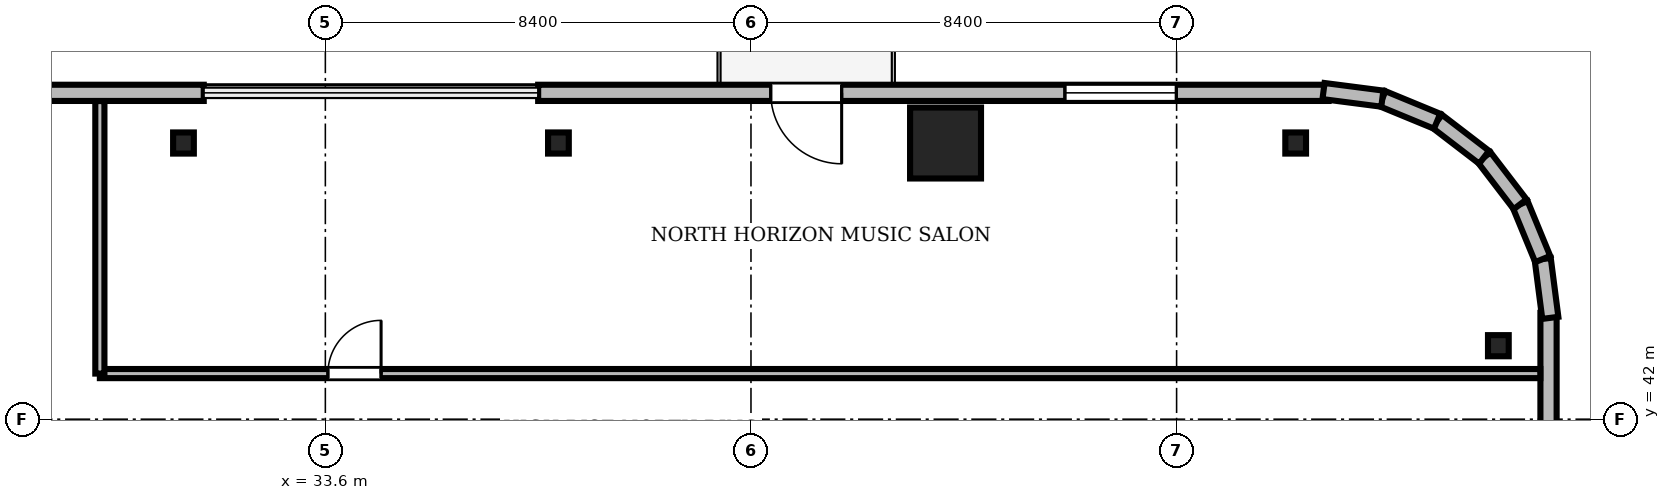
"""IFC4 building model, lengths in metres.
Left out: names, types, materials, properties, quantities, classifications, styles, units other than length and angle.
Written with IfcOpenShell. Run it as: python <this file> out.ifc"""

import sys

from ifc_helpers import new_model, si_unit, direction, frame, frame_2d, origin, origin_2d, place, context, subcontext, project, spatial, rectangle, i_section, extrude, source, transform, mapped, element, fill, save


model = new_model("IFC4")
c1 = context("Model", 3, precision=1e-05, world=origin(), true_north=direction((0.0, 1.0)))
c2 = subcontext(c1, "Body", "Model", "MODEL_VIEW")
j1 = project(units=[si_unit("LENGTHUNIT", "METRE"), si_unit("PLANEANGLEUNIT", "RADIAN")], contexts=[c1])
p1 = place(None, origin())
s1 = spatial("IfcSite", under=j1, at=p1, CompositionType="ELEMENT")
p2 = place(p1, origin())
s2 = spatial("IfcBuilding", under=s1, at=p2, CompositionType="ELEMENT")
p3 = place(p2, frame((0.0, 0.0, 184.8)))
s3 = spatial("IfcBuildingStorey", under=s2, at=p3, CompositionType="ELEMENT", Elevation=184.8)
m1 = source(origin(), c2, "Body", "SweptSolid", [
    extrude(rectangle(XDim=1.4, YDim=1.4, at=origin_2d()), origin(), (0.0, 0.0, 1.0), 3.53),
])
p4 = place(p3, frame((45.84, 47.45, 0.0), z_axis=(0.0, 0.0, 1.0), x_axis=(1.0, 0.0, 0.0)))
e1 = element("IfcColumn", 1, at=p4, inside=s3, PredefinedType="COLUMN", context=c2, shape_type="MappedRepresentation", body=[
    mapped(m1, transform((0.0, 0.0, 0.0), scale=1.0)),
])
m2 = source(origin(), c2, "Body", "SweptSolid", [
    extrude(i_section(OverallWidth=0.409, OverallDepth=0.417, WebThickness=0.021, FlangeThickness=0.033, FilletRadius=0.015, at=origin_2d()), origin(), (0.0, 0.0, 1.0), 3.53),
])
for number, where, z_axis, x_axis in (
    (2, (56.75, 43.45, 0.0), (0.0, 0.0, 1.0), (1.0, 0.0, 0.0)),
    (3, (52.75, 47.45, 0.0), (0.0, 0.0, 1.0), (1.0, 0.0, 0.0)),
    (4, (38.2, 47.45, 0.0), (0.0, 0.0, 1.0), (1.0, 0.0, 0.0)),
    (5, (30.8, 47.45, 0.0), (0.0, 0.0, 1.0), (1.0, 0.0, 0.0)),
):
    element("IfcColumn", number, at=place(p3, frame(where, z_axis=z_axis, x_axis=x_axis)), inside=s3, PredefinedType="COLUMN", context=c2, shape_type="MappedRepresentation", body=[
        mapped(m2, transform((0.0, 0.0, 0.0), scale=1.0)),
    ])
m3 = source(origin(), c2, "Body", "SweptSolid", [
    extrude(rectangle(XDim=15.6, YDim=0.32, at=frame_2d((7.8, 0.0))), origin(), (0.0, 0.0, 1.0), 3.53),
])
p5 = place(p3, frame((53.4, 48.44, 0.0), z_axis=(0.0, 0.0, 1.0), x_axis=(-1.0, 0.0, 0.0)))
e6 = element("IfcWall", 6, at=p5, inside=s3, PredefinedType="SOLIDWALL", context=c2, shape_type="MappedRepresentation", body=[
    mapped(m3, transform((0.0, 0.0, 0.0), scale=1.0)),
])
m4 = source(origin(), c2, "Body", "SweptSolid", [
    extrude(rectangle(XDim=1.4, YDim=2.3, at=frame_2d((0.7, 1.15))), frame((0.0, 0.17, 0.0), z_axis=(0.0, -1.0, 0.0), x_axis=(1.0, 0.0, 0.0)), (0.0, 0.0, 1.0), 0.34),
])
p6 = place(p5, frame((9.61, 0.0, 0.0)))
e7 = element("IfcOpeningElement", 7, at=p6, cuts=e6, PredefinedType="OPENING", context=c2, shape_type="MappedRepresentation", body=[
    mapped(m4, transform((0.0, 0.0, 0.0), scale=1.0)),
])
m5 = source(origin(), c2, "Body", "SweptSolid", [
    extrude(rectangle(XDim=2.2, YDim=2.4, at=frame_2d((1.1, 1.2))), frame((0.0, 0.17, 0.0), z_axis=(0.0, -1.0, 0.0), x_axis=(1.0, 0.0, 0.0)), (0.0, 0.0, 1.0), 0.34),
])
p7 = place(p5, frame((3.005, 0.0, 0.72)))
e8 = element("IfcOpeningElement", 8, at=p7, cuts=e6, PredefinedType="OPENING", context=c2, shape_type="MappedRepresentation", body=[
    mapped(m5, transform((0.0, 0.0, 0.0), scale=1.0)),
])
p8 = place(p3, frame((31.2, 48.44, 0.0), z_axis=(0.0, 0.0, 1.0), x_axis=(-1.0, 0.0, 0.0)))
e9 = element("IfcWall", 9, at=p8, inside=s3, PredefinedType="SOLIDWALL", context=c2, shape_type="MappedRepresentation", body=[
    mapped(m3, transform((0.0, 0.0, 0.0), scale=1.0)),
])
p9 = place(p8, frame((10.395, 0.0, 0.72)))
e10 = element("IfcOpeningElement", 10, at=p9, cuts=e9, PredefinedType="OPENING", context=c2, shape_type="MappedRepresentation", body=[
    mapped(m5, transform((0.0, 0.0, 0.0), scale=1.0)),
])
m6 = source(origin(), c2, "Body", "SweptSolid", [
    extrude(rectangle(XDim=15.6, YDim=0.32, at=frame_2d((7.8, 0.0))), origin(), (0.0, 0.0, 1.0), 3.53),
])
p10 = place(p3, frame((57.74, 28.5, 0.0), z_axis=(0.0, 0.0, 1.0), x_axis=(0.0, 1.0, 0.0)))
e11 = element("IfcWall", 11, at=p10, inside=s3, PredefinedType="SOLIDWALL", context=c2, shape_type="MappedRepresentation", body=[
    mapped(m6, transform((0.0, 0.0, 0.0), scale=1.0)),
])
p11 = place(p10, frame((10.395, 0.0, 0.72)))
e12 = element("IfcOpeningElement", 12, at=p11, cuts=e11, PredefinedType="OPENING", context=c2, shape_type="MappedRepresentation", body=[
    mapped(m5, transform((0.0, 0.0, 0.0), scale=1.0)),
])
m7 = source(origin(), c2, "Body", "SweptSolid", [
    extrude(rectangle(XDim=1.17, YDim=0.32, at=frame_2d((0.585, 0.0))), origin(), (0.0, 0.0, 1.0), 3.53),
])
p12 = place(p3, frame((57.776, 44.0, 0.0), z_axis=(0.0, 0.0, 1.0), x_axis=(-0.128295670475, 0.991735963317, 0.0)))
e13 = element("IfcWall", 13, at=p12, inside=s3, PredefinedType="SOLIDWALL", context=c2, shape_type="MappedRepresentation", body=[
    mapped(m7, transform((0.0, 0.0, 0.0), scale=1.0)),
])
m8 = source(origin(), c2, "Body", "SweptSolid", [
    extrude(rectangle(XDim=1.169, YDim=0.32, at=frame_2d((0.584, 0.0))), origin(), (0.0, 0.0, 1.0), 3.53),
])
p13 = place(p3, frame((57.625, 45.16, 0.0), z_axis=(0.0, 0.0, 1.0), x_axis=(-0.381054331552, 0.924552646638, 0.0)))
e14 = element("IfcWall", 14, at=p13, inside=s3, PredefinedType="SOLIDWALL", context=c2, shape_type="MappedRepresentation", body=[
    mapped(m8, transform((0.0, 0.0, 0.0), scale=1.0)),
])
m9 = source(origin(), c2, "Body", "SweptSolid", [
    extrude(rectangle(XDim=1.169, YDim=0.32, at=frame_2d((0.584, 0.0))), origin(), (0.0, 0.0, 1.0), 3.53),
])
p14 = place(p3, frame((57.18, 46.241, 0.0), z_axis=(0.0, 0.0, 1.0), x_axis=(-0.608387696831, 0.793639975269, 0.0)))
e15 = element("IfcWall", 15, at=p14, inside=s3, PredefinedType="SOLIDWALL", context=c2, shape_type="MappedRepresentation", body=[
    mapped(m9, transform((0.0, 0.0, 0.0), scale=1.0)),
])
m10 = source(origin(), c2, "Body", "SweptSolid", [
    extrude(rectangle(XDim=1.169, YDim=0.32, at=frame_2d((0.584, 0.0))), origin(), (0.0, 0.0, 1.0), 3.53),
])
p15 = place(p3, frame((56.469, 47.169, 0.0), z_axis=(0.0, 0.0, 1.0), x_axis=(-0.793663520347, 0.608356981114, 0.0)))
e16 = element("IfcWall", 16, at=p15, inside=s3, PredefinedType="SOLIDWALL", context=c2, shape_type="MappedRepresentation", body=[
    mapped(m10, transform((0.0, 0.0, 0.0), scale=1.0)),
])
p16 = place(p3, frame((55.541, 47.88, 0.0), z_axis=(0.0, 0.0, 1.0), x_axis=(-0.924552646638, 0.381054331552, 0.0)))
e17 = element("IfcWall", 17, at=p16, inside=s3, PredefinedType="SOLIDWALL", context=c2, shape_type="MappedRepresentation", body=[
    mapped(m8, transform((0.0, 0.0, 0.0), scale=1.0)),
])
p17 = place(p3, frame((54.46, 48.325, 0.0), z_axis=(0.0, 0.0, 1.0), x_axis=(-0.991735963317, 0.128295670475, 0.0)))
e18 = element("IfcWall", 18, at=p17, inside=s3, PredefinedType="SOLIDWALL", context=c2, shape_type="MappedRepresentation", body=[
    mapped(m7, transform((0.0, 0.0, 0.0), scale=1.0)),
])
m11 = source(origin(), c2, "Body", "SweptSolid", [
    extrude(rectangle(XDim=28.428, YDim=0.18, at=frame_2d((14.214, 0.0))), origin(), (0.0, 0.0, 1.0), 2.772),
])
p18 = place(p3, frame((29.15, 42.9, 0.0), z_axis=(0.0, 0.0, 1.0), x_axis=(1.0, 0.0, 0.0)))
e19 = element("IfcWall", 19, at=p18, inside=s3, PredefinedType="PARTITIONING", context=c2, shape_type="MappedRepresentation", body=[
    mapped(m11, transform((0.0, 0.0, 0.0), scale=1.0)),
])
m12 = source(origin(), c2, "Body", "SweptSolid", [
    extrude(rectangle(XDim=1.05, YDim=2.2, at=frame_2d((0.525, 1.1))), frame((0.0, 0.1, 0.0), z_axis=(0.0, -1.0, 0.0), x_axis=(1.0, 0.0, 0.0)), (0.0, 0.0, 1.0), 0.2),
])
p19 = place(p18, frame((4.5, 0.0, 0.0)))
e20 = element("IfcOpeningElement", 20, at=p19, cuts=e19, PredefinedType="OPENING", context=c2, shape_type="MappedRepresentation", body=[
    mapped(m12, transform((0.0, 0.0, 0.0), scale=1.0)),
])
m13 = source(origin(), c2, "Body", "SweptSolid", [
    extrude(rectangle(XDim=5.378, YDim=0.18, at=frame_2d((2.689, 0.0))), origin(), (0.0, 0.0, 1.0), 2.772),
])
p20 = place(p3, frame((29.15, 42.9, 0.0), z_axis=(0.0, 0.0, 1.0), x_axis=(0.0, 1.0, 0.0)))
e21 = element("IfcWall", 21, at=p20, inside=s3, PredefinedType="PARTITIONING", context=c2, shape_type="MappedRepresentation", body=[
    mapped(m13, transform((0.0, 0.0, 0.0), scale=1.0)),
])
m14 = source(origin(), c2, "Body", "SweptSolid", [
    extrude(rectangle(XDim=1.4, YDim=2.3, at=frame_2d((0.7, 1.15))), frame((0.0, 0.025, 0.0), z_axis=(0.0, -1.0, 0.0), x_axis=(1.0, 0.0, 0.0)), (0.0, 0.0, 1.0), 0.05),
])
p21 = place(p6, frame((1.4, 0.0, 0.0), z_axis=(0.0, 0.0, 1.0), x_axis=(-1.0, 0.0, 0.0)))
e22 = element("IfcDoor", 22, at=p21, inside=s3, OperationType="DOUBLE_DOOR_SLIDING", PredefinedType="DOOR", context=c2, shape_type="MappedRepresentation", body=[
    mapped(m14, transform((0.0, 0.0, 0.0), scale=1.0)),
])
fill(e7, e22)
m15 = source(origin(), c2, "Body", "SweptSolid", [
    extrude(rectangle(XDim=2.2, YDim=2.4, at=frame_2d((1.1, 1.2))), frame((0.0, 0.03, 0.0), z_axis=(0.0, -1.0, 0.0), x_axis=(1.0, 0.0, 0.0)), (0.0, 0.0, 1.0), 0.06),
])
p22 = place(p7, origin())
e23 = element("IfcWindow", 23, at=p22, inside=s3, PartitioningType="SINGLE_PANEL", PredefinedType="WINDOW", context=c2, shape_type="MappedRepresentation", body=[
    mapped(m15, transform((0.0, 0.0, 0.0), scale=1.0)),
])
fill(e8, e23)
m16 = source(origin(), c2, "Body", "SweptSolid", [
    extrude(rectangle(XDim=1.05, YDim=2.2, at=frame_2d((0.525, 1.1))), frame((0.0, 0.025, 0.0), z_axis=(0.0, -1.0, 0.0), x_axis=(1.0, 0.0, 0.0)), (0.0, 0.0, 1.0), 0.05),
])
p23 = place(p19, origin())
e24 = element("IfcDoor", 24, at=p23, inside=s3, OperationType="SINGLE_SWING_RIGHT", PredefinedType="DOOR", context=c2, shape_type="MappedRepresentation", body=[
    mapped(m16, transform((0.0, 0.0, 0.0), scale=1.0)),
])
fill(e20, e24)
save(model, sys.argv[1])
